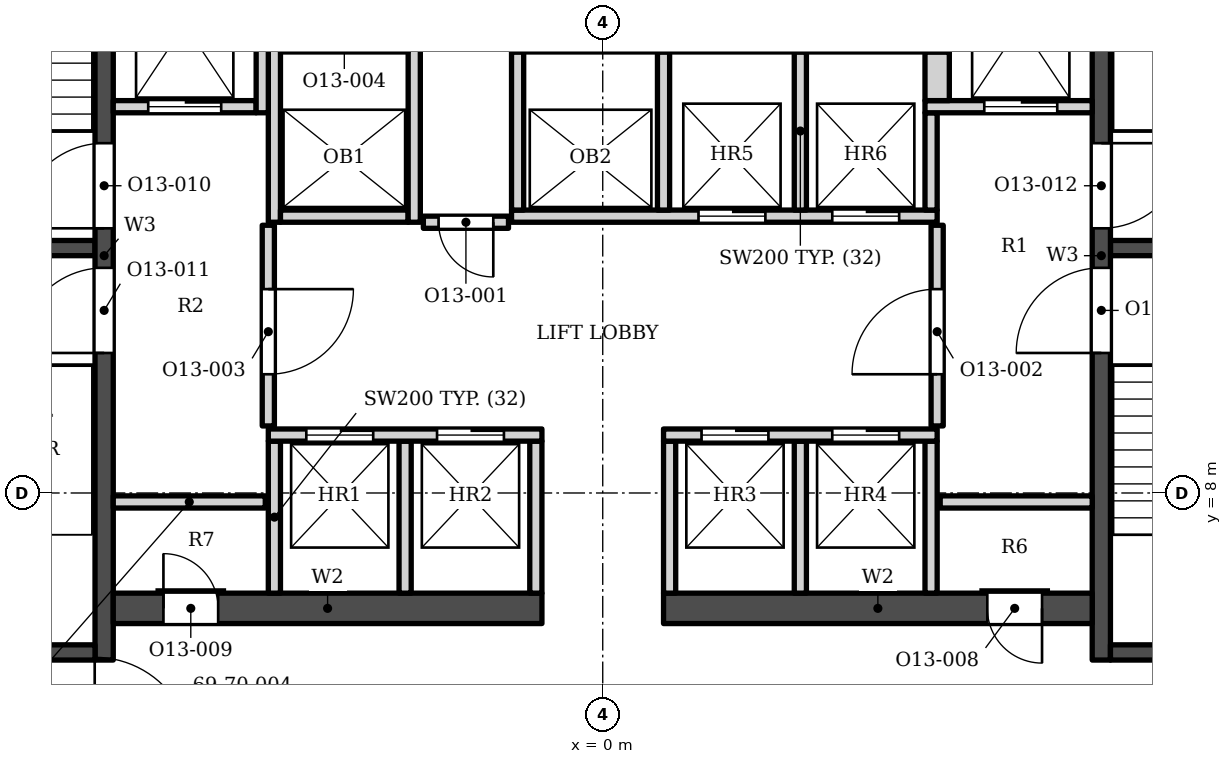
"""IFC4 building model, lengths in metres.
Left out: names, types, materials, properties, quantities, classifications, styles, units other than length and angle.
Written with IfcOpenShell. Run it as: python <this file> out.ifc"""

import sys

from ifc_helpers import new_model, si_unit, direction, frame, frame_2d, origin, place, context, subcontext, project, spatial, rectangle, extrude, element, fill, save


model = new_model("IFC4")
c1 = context("Model", 3, precision=1e-05, world=origin(), true_north=direction((0.0, 1.0)))
c2 = subcontext(c1, "Body", "Model", "MODEL_VIEW")
j1 = project(units=[si_unit("LENGTHUNIT", "METRE"), si_unit("PLANEANGLEUNIT", "RADIAN")], contexts=[c1])
p1 = place(None, origin())
s1 = spatial("IfcSite", under=j1, at=p1, CompositionType="ELEMENT")
p2 = place(p1, origin())
s2 = spatial("IfcBuilding", under=s1, at=p2, CompositionType="ELEMENT")
p3 = place(p2, frame((0.0, 0.0, 287.2)))
s3 = spatial("IfcBuildingStorey", under=s2, at=p3, CompositionType="ELEMENT", Elevation=287.2)
p4 = place(p3, frame((-8.2, 5.253, 0.0), z_axis=(0.0, 0.0, 1.0), x_axis=(0.0, 1.0, 0.0)))
e1 = element("IfcWall", 1, at=p4, inside=s3, PredefinedType="SHEAR", context=c2, shape_type="SweptSolid", body=[
    extrude(rectangle(XDim=13.3, YDim=0.3, at=frame_2d((6.65, 0.0))), origin(), (0.0, 0.0, 1.0), 3.9),
])
p5 = place(p4, frame((7.1, 0.0, 0.0)))
e2 = element("IfcOpeningElement", 2, at=p5, cuts=e1, PredefinedType="OPENING", context=c2, shape_type="SweptSolid", body=[
    extrude(rectangle(XDim=1.4, YDim=2.1, at=frame_2d((0.7, 1.05))), frame((0.0, 0.16, 0.0), z_axis=(0.0, -1.0, 0.0), x_axis=(1.0, 0.0, 0.0)), (0.0, 0.0, 1.0), 0.32),
])
p6 = place(p4, frame((5.05, 0.0, 0.0)))
e3 = element("IfcOpeningElement", 3, at=p6, cuts=e1, PredefinedType="OPENING", context=c2, shape_type="SweptSolid", body=[
    extrude(rectangle(XDim=1.4, YDim=2.1, at=frame_2d((0.7, 1.05))), frame((0.0, 0.16, 0.0), z_axis=(0.0, -1.0, 0.0), x_axis=(1.0, 0.0, 0.0)), (0.0, 0.0, 1.0), 0.32),
])
for number, where, z_axis, x_axis in (
    (4, (-12.1, 12.028, 0.0), (0.0, 0.0, 1.0), (1.0, 0.0, 0.0)),
    (5, (-12.1, 5.378, 0.0), (0.0, 0.0, 1.0), (1.0, 0.0, 0.0)),
):
    element("IfcWall", number, at=place(p3, frame(where, z_axis=z_axis, x_axis=x_axis)), inside=s3, PredefinedType="SHEAR", context=c2, shape_type="SweptSolid", body=[
        extrude(rectangle(XDim=3.75, YDim=0.25, at=frame_2d((1.875, 0.0))), origin(), (0.0, 0.0, 1.0), 3.9),
    ])
p7 = place(p3, frame((8.2, 5.253, 0.0), z_axis=(0.0, 0.0, 1.0), x_axis=(0.0, 1.0, 0.0)))
e6 = element("IfcWall", 6, at=p7, inside=s3, PredefinedType="SHEAR", context=c2, shape_type="SweptSolid", body=[
    extrude(rectangle(XDim=13.3, YDim=0.3, at=frame_2d((6.65, 0.0))), origin(), (0.0, 0.0, 1.0), 3.9),
])
p8 = place(p7, frame((7.1, 0.0, 0.0)))
e7 = element("IfcOpeningElement", 7, at=p8, cuts=e6, PredefinedType="OPENING", context=c2, shape_type="SweptSolid", body=[
    extrude(rectangle(XDim=1.4, YDim=2.1, at=frame_2d((0.7, 1.05))), frame((0.0, 0.16, 0.0), z_axis=(0.0, -1.0, 0.0), x_axis=(1.0, 0.0, 0.0)), (0.0, 0.0, 1.0), 0.32),
])
p9 = place(p7, frame((5.05, 0.0, 0.0)))
e8 = element("IfcOpeningElement", 8, at=p9, cuts=e6, PredefinedType="OPENING", context=c2, shape_type="SweptSolid", body=[
    extrude(rectangle(XDim=1.4, YDim=2.1, at=frame_2d((0.7, 1.05))), frame((0.0, 0.16, 0.0), z_axis=(0.0, -1.0, 0.0), x_axis=(1.0, 0.0, 0.0)), (0.0, 0.0, 1.0), 0.32),
])
for number, where, z_axis, x_axis in (
    (9, (8.35, 12.028, 0.0), (0.0, 0.0, 1.0), (1.0, 0.0, 0.0)),
    (10, (8.35, 5.378, 0.0), (0.0, 0.0, 1.0), (1.0, 0.0, 0.0)),
):
    element("IfcWall", number, at=place(p3, frame(where, z_axis=z_axis, x_axis=x_axis)), inside=s3, PredefinedType="SHEAR", context=c2, shape_type="SweptSolid", body=[
        extrude(rectangle(XDim=3.75, YDim=0.25, at=frame_2d((1.875, 0.0))), origin(), (0.0, 0.0, 1.0), 3.9),
    ])
p10 = place(p3, frame((-8.05, 6.103, 0.0), z_axis=(0.0, 0.0, 1.0), x_axis=(1.0, 0.0, 0.0)))
e11 = element("IfcWall", 11, at=p10, inside=s3, PredefinedType="SHEAR", context=c2, shape_type="SweptSolid", body=[
    extrude(rectangle(XDim=7.05, YDim=0.5, at=frame_2d((3.525, 0.0))), origin(), (0.0, 0.0, 1.0), 3.9),
])
p11 = place(p10, frame((0.825, 0.0, 0.0)))
e12 = element("IfcOpeningElement", 12, at=p11, cuts=e11, PredefinedType="OPENING", context=c2, shape_type="SweptSolid", body=[
    extrude(rectangle(XDim=0.9, YDim=2.1, at=frame_2d((0.45, 1.05))), frame((0.0, 0.26, 0.0), z_axis=(0.0, -1.0, 0.0), x_axis=(1.0, 0.0, 0.0)), (0.0, 0.0, 1.0), 0.52),
])
p12 = place(p3, frame((1.0, 6.103, 0.0), z_axis=(0.0, 0.0, 1.0), x_axis=(1.0, 0.0, 0.0)))
e13 = element("IfcWall", 13, at=p12, inside=s3, PredefinedType="SHEAR", context=c2, shape_type="SweptSolid", body=[
    extrude(rectangle(XDim=7.05, YDim=0.5, at=frame_2d((3.525, 0.0))), origin(), (0.0, 0.0, 1.0), 3.9),
])
p13 = place(p12, frame((5.325, 0.0, 0.0)))
e14 = element("IfcOpeningElement", 14, at=p13, cuts=e13, PredefinedType="OPENING", context=c2, shape_type="SweptSolid", body=[
    extrude(rectangle(XDim=0.9, YDim=2.1, at=frame_2d((0.45, 1.05))), frame((0.0, 0.26, 0.0), z_axis=(0.0, -1.0, 0.0), x_axis=(1.0, 0.0, 0.0)), (0.0, 0.0, 1.0), 0.52),
])
for number, where, z_axis, x_axis in (
    (15, (-5.4, 6.353, 0.0), (0.0, 0.0, 1.0), (0.0, 1.0, 0.0)),
    (16, (-3.25, 6.353, 0.0), (0.0, 0.0, 1.0), (0.0, 1.0, 0.0)),
    (17, (-1.1, 6.353, 0.0), (0.0, 0.0, 1.0), (0.0, 1.0, 0.0)),
    (18, (1.1, 6.353, 0.0), (0.0, 0.0, 1.0), (0.0, 1.0, 0.0)),
    (19, (3.25, 6.353, 0.0), (0.0, 0.0, 1.0), (0.0, 1.0, 0.0)),
    (20, (5.4, 6.353, 0.0), (0.0, 0.0, 1.0), (0.0, 1.0, 0.0)),
    (21, (-8.05, 7.853, 0.0), (0.0, 0.0, 1.0), (1.0, 0.0, 0.0)),
    (22, (5.55, 7.853, 0.0), (0.0, 0.0, 1.0), (1.0, 0.0, 0.0)),
):
    element("IfcWall", number, at=place(p3, frame(where, z_axis=z_axis, x_axis=x_axis)), inside=s3, PredefinedType="SOLIDWALL", context=c2, shape_type="SweptSolid", body=[
        extrude(rectangle(XDim=2.5, YDim=0.2, at=frame_2d((1.25, 0.0))), origin(), (0.0, 0.0, 1.0), 3.73),
    ])
p14 = place(p3, frame((-5.5, 8.953, 0.0), z_axis=(0.0, 0.0, 1.0), x_axis=(1.0, 0.0, 0.0)))
e23 = element("IfcWall", 23, at=p14, inside=s3, PredefinedType="SOLIDWALL", context=c2, shape_type="SweptSolid", body=[
    extrude(rectangle(XDim=4.5, YDim=0.2, at=frame_2d((2.25, 0.0))), origin(), (0.0, 0.0, 1.0), 3.73),
])
p15 = place(p14, frame((0.625, 0.0, 0.0)))
e24 = element("IfcOpeningElement", 24, at=p15, cuts=e23, PredefinedType="OPENING", context=c2, shape_type="SweptSolid", body=[
    extrude(rectangle(XDim=1.1, YDim=2.1, at=frame_2d((0.55, 1.05))), frame((0.0, 0.11, 0.0), z_axis=(0.0, -1.0, 0.0), x_axis=(1.0, 0.0, 0.0)), (0.0, 0.0, 1.0), 0.22),
])
p16 = place(p14, frame((2.775, 0.0, 0.0)))
e25 = element("IfcOpeningElement", 25, at=p16, cuts=e23, PredefinedType="OPENING", context=c2, shape_type="SweptSolid", body=[
    extrude(rectangle(XDim=1.1, YDim=2.1, at=frame_2d((0.55, 1.05))), frame((0.0, 0.11, 0.0), z_axis=(0.0, -1.0, 0.0), x_axis=(1.0, 0.0, 0.0)), (0.0, 0.0, 1.0), 0.22),
])
p17 = place(p3, frame((1.0, 8.953, 0.0), z_axis=(0.0, 0.0, 1.0), x_axis=(1.0, 0.0, 0.0)))
e26 = element("IfcWall", 26, at=p17, inside=s3, PredefinedType="SOLIDWALL", context=c2, shape_type="SweptSolid", body=[
    extrude(rectangle(XDim=4.5, YDim=0.2, at=frame_2d((2.25, 0.0))), origin(), (0.0, 0.0, 1.0), 3.73),
])
p18 = place(p17, frame((0.625, 0.0, 0.0)))
e27 = element("IfcOpeningElement", 27, at=p18, cuts=e26, PredefinedType="OPENING", context=c2, shape_type="SweptSolid", body=[
    extrude(rectangle(XDim=1.1, YDim=2.1, at=frame_2d((0.55, 1.05))), frame((0.0, 0.11, 0.0), z_axis=(0.0, -1.0, 0.0), x_axis=(1.0, 0.0, 0.0)), (0.0, 0.0, 1.0), 0.22),
])
p19 = place(p17, frame((2.775, 0.0, 0.0)))
e28 = element("IfcOpeningElement", 28, at=p19, cuts=e26, PredefinedType="OPENING", context=c2, shape_type="SweptSolid", body=[
    extrude(rectangle(XDim=1.1, YDim=2.1, at=frame_2d((0.55, 1.05))), frame((0.0, 0.11, 0.0), z_axis=(0.0, -1.0, 0.0), x_axis=(1.0, 0.0, 0.0)), (0.0, 0.0, 1.0), 0.22),
])
p20 = place(p3, frame((-5.5, 9.103, 0.0), z_axis=(0.0, 0.0, 1.0), x_axis=(0.0, 1.0, 0.0)))
e29 = element("IfcWall", 29, at=p20, inside=s3, PredefinedType="SOLIDWALL", context=c2, shape_type="SweptSolid", body=[
    extrude(rectangle(XDim=3.3, YDim=0.2, at=frame_2d((1.65, 0.0))), origin(), (0.0, 0.0, 1.0), 3.73),
])
p21 = place(p20, frame((0.85, 0.0, 0.0)))
e30 = element("IfcOpeningElement", 30, at=p21, cuts=e29, PredefinedType="OPENING", context=c2, shape_type="SweptSolid", body=[
    extrude(rectangle(XDim=1.4, YDim=2.1, at=frame_2d((0.7, 1.05))), frame((0.0, 0.11, 0.0), z_axis=(0.0, -1.0, 0.0), x_axis=(1.0, 0.0, 0.0)), (0.0, 0.0, 1.0), 0.22),
])
p22 = place(p3, frame((5.5, 9.103, 0.0), z_axis=(0.0, 0.0, 1.0), x_axis=(0.0, 1.0, 0.0)))
e31 = element("IfcWall", 31, at=p22, inside=s3, PredefinedType="SOLIDWALL", context=c2, shape_type="SweptSolid", body=[
    extrude(rectangle(XDim=3.3, YDim=0.2, at=frame_2d((1.65, 0.0))), origin(), (0.0, 0.0, 1.0), 3.73),
])
p23 = place(p22, frame((0.85, 0.0, 0.0)))
e32 = element("IfcOpeningElement", 32, at=p23, cuts=e31, PredefinedType="OPENING", context=c2, shape_type="SweptSolid", body=[
    extrude(rectangle(XDim=1.4, YDim=2.1, at=frame_2d((0.7, 1.05))), frame((0.0, 0.11, 0.0), z_axis=(0.0, -1.0, 0.0), x_axis=(1.0, 0.0, 0.0)), (0.0, 0.0, 1.0), 0.22),
])
p24 = place(p3, frame((-2.95, 12.453, 0.0), z_axis=(0.0, 0.0, 1.0), x_axis=(1.0, 0.0, 0.0)))
e33 = element("IfcWall", 33, at=p24, inside=s3, PredefinedType="SOLIDWALL", context=c2, shape_type="SweptSolid", body=[
    extrude(rectangle(XDim=1.4, YDim=0.2, at=frame_2d((0.7, 0.0))), origin(), (0.0, 0.0, 1.0), 3.73),
])
p25 = place(p24, frame((0.25, 0.0, 0.0)))
e34 = element("IfcOpeningElement", 34, at=p25, cuts=e33, PredefinedType="OPENING", context=c2, shape_type="SweptSolid", body=[
    extrude(rectangle(XDim=0.9, YDim=2.1, at=frame_2d((0.45, 1.05))), frame((0.0, 0.11, 0.0), z_axis=(0.0, -1.0, 0.0), x_axis=(1.0, 0.0, 0.0)), (0.0, 0.0, 1.0), 0.22),
])
p26 = place(p3, frame((-5.4, 12.453, 0.0), z_axis=(0.0, 0.0, 1.0), x_axis=(0.0, 1.0, 0.0)))
e35 = element("IfcWall", 35, at=p26, inside=s3, PredefinedType="SOLIDWALL", context=c2, shape_type="SweptSolid", body=[
    extrude(rectangle(XDim=3.0, YDim=0.2, at=frame_2d((1.5, 0.0))), origin(), (0.0, 0.0, 1.0), 3.73),
])
p27 = place(p3, frame((-5.3, 12.552, 0.0), z_axis=(0.0, 0.0, 1.0), x_axis=(1.0, 0.0, 0.0)))
e36 = element("IfcWall", 36, at=p27, inside=s3, PredefinedType="SOLIDWALL", context=c2, shape_type="SweptSolid", body=[
    extrude(rectangle(XDim=2.1, YDim=0.2, at=frame_2d((1.05, 0.0))), origin(), (0.0, 0.0, 1.0), 3.73),
])
p28 = place(p3, frame((-3.1, 12.453, 0.0), z_axis=(0.0, 0.0, 1.0), x_axis=(0.0, 1.0, 0.0)))
e37 = element("IfcWall", 37, at=p28, inside=s3, PredefinedType="SOLIDWALL", context=c2, shape_type="SweptSolid", body=[
    extrude(rectangle(XDim=3.0, YDim=0.2, at=frame_2d((1.5, 0.0))), origin(), (0.0, 0.0, 1.0), 3.73),
])
p29 = place(p3, frame((-1.5, 12.552, 0.0), z_axis=(0.0, 0.0, 1.0), x_axis=(1.0, 0.0, 0.0)))
e38 = element("IfcWall", 38, at=p29, inside=s3, PredefinedType="SOLIDWALL", context=c2, shape_type="SweptSolid", body=[
    extrude(rectangle(XDim=7.0, YDim=0.2, at=frame_2d((3.5, 0.0))), origin(), (0.0, 0.0, 1.0), 3.73),
])
p30 = place(p29, frame((3.075, 0.0, 0.0)))
e39 = element("IfcOpeningElement", 39, at=p30, cuts=e38, PredefinedType="OPENING", context=c2, shape_type="SweptSolid", body=[
    extrude(rectangle(XDim=1.1, YDim=2.1, at=frame_2d((0.55, 1.05))), frame((0.0, 0.11, 0.0), z_axis=(0.0, -1.0, 0.0), x_axis=(1.0, 0.0, 0.0)), (0.0, 0.0, 1.0), 0.22),
])
p31 = place(p29, frame((5.275, 0.0, 0.0)))
e40 = element("IfcOpeningElement", 40, at=p31, cuts=e38, PredefinedType="OPENING", context=c2, shape_type="SweptSolid", body=[
    extrude(rectangle(XDim=1.1, YDim=2.1, at=frame_2d((0.55, 1.05))), frame((0.0, 0.11, 0.0), z_axis=(0.0, -1.0, 0.0), x_axis=(1.0, 0.0, 0.0)), (0.0, 0.0, 1.0), 0.22),
])
for number, where, z_axis, x_axis in (
    (41, (-1.4, 12.653, 0.0), (0.0, 0.0, 1.0), (0.0, 1.0, 0.0)),
    (42, (1.0, 12.653, 0.0), (0.0, 0.0, 1.0), (0.0, 1.0, 0.0)),
    (43, (3.25, 12.653, 0.0), (0.0, 0.0, 1.0), (0.0, 1.0, 0.0)),
):
    element("IfcWall", number, at=place(p3, frame(where, z_axis=z_axis, x_axis=x_axis)), inside=s3, PredefinedType="SOLIDWALL", context=c2, shape_type="SweptSolid", body=[
        extrude(rectangle(XDim=2.6, YDim=0.2, at=frame_2d((1.3, 0.0))), origin(), (0.0, 0.0, 1.0), 3.73),
    ])
p32 = place(p3, frame((5.4, 12.653, 0.0), z_axis=(0.0, 0.0, 1.0), x_axis=(0.0, 1.0, 0.0)))
e44 = element("IfcWall", 44, at=p32, inside=s3, PredefinedType="SOLIDWALL", context=c2, shape_type="SweptSolid", body=[
    extrude(rectangle(XDim=1.6, YDim=0.2, at=frame_2d((0.8, 0.0))), origin(), (0.0, 0.0, 1.0), 3.73),
])
p33 = place(p3, frame((-8.05, 14.353, 0.0), z_axis=(0.0, 0.0, 1.0), x_axis=(1.0, 0.0, 0.0)))
e45 = element("IfcWall", 45, at=p33, inside=s3, PredefinedType="SOLIDWALL", context=c2, shape_type="SweptSolid", body=[
    extrude(rectangle(XDim=2.35, YDim=0.2, at=frame_2d((1.175, 0.0))), origin(), (0.0, 0.0, 1.0), 3.73),
])
p34 = place(p33, frame((0.575, 0.0, 0.0)))
e46 = element("IfcOpeningElement", 46, at=p34, cuts=e45, PredefinedType="OPENING", context=c2, shape_type="SweptSolid", body=[
    extrude(rectangle(XDim=1.2, YDim=2.1, at=frame_2d((0.6, 1.05))), frame((0.0, 0.11, 0.0), z_axis=(0.0, -1.0, 0.0), x_axis=(1.0, 0.0, 0.0)), (0.0, 0.0, 1.0), 0.22),
])
p35 = place(p3, frame((-5.6, 14.253, 0.0), z_axis=(0.0, 0.0, 1.0), x_axis=(0.0, 1.0, 0.0)))
e47 = element("IfcWall", 47, at=p35, inside=s3, PredefinedType="SOLIDWALL", context=c2, shape_type="SweptSolid", body=[
    extrude(rectangle(XDim=4.3, YDim=0.2, at=frame_2d((2.15, 0.0))), origin(), (0.0, 0.0, 1.0), 3.73),
])
p36 = place(p3, frame((5.3, 14.353, 0.0), z_axis=(0.0, 0.0, 1.0), x_axis=(1.0, 0.0, 0.0)))
e48 = element("IfcWall", 48, at=p36, inside=s3, PredefinedType="SOLIDWALL", context=c2, shape_type="SweptSolid", body=[
    extrude(rectangle(XDim=2.75, YDim=0.2, at=frame_2d((1.375, 0.0))), origin(), (0.0, 0.0, 1.0), 3.73),
])
p37 = place(p36, frame((0.975, 0.0, 0.0)))
e49 = element("IfcOpeningElement", 49, at=p37, cuts=e48, PredefinedType="OPENING", context=c2, shape_type="SweptSolid", body=[
    extrude(rectangle(XDim=1.2, YDim=2.1, at=frame_2d((0.6, 1.05))), frame((0.0, 0.11, 0.0), z_axis=(0.0, -1.0, 0.0), x_axis=(1.0, 0.0, 0.0)), (0.0, 0.0, 1.0), 0.22),
])
p38 = place(p3, frame((5.5, 14.453, 0.0), z_axis=(0.0, 0.0, 1.0), x_axis=(0.0, 1.0, 0.0)))
e50 = element("IfcWall", 50, at=p38, inside=s3, PredefinedType="SOLIDWALL", context=c2, shape_type="SweptSolid", body=[
    extrude(rectangle(XDim=0.8, YDim=0.4, at=frame_2d((0.4, 0.0))), origin(), (0.0, 0.0, 1.0), 3.73),
])
p39 = place(p3, frame((-5.3, 15.353, 0.0), z_axis=(0.0, 0.0, 1.0), x_axis=(1.0, 0.0, 0.0)))
e51 = element("IfcWall", 51, at=p39, inside=s3, PredefinedType="SOLIDWALL", context=c2, shape_type="SweptSolid", body=[
    extrude(rectangle(XDim=2.1, YDim=0.2, at=frame_2d((1.05, 0.0))), origin(), (0.0, 0.0, 1.0), 3.73),
])
p40 = place(p3, frame((-1.5, 15.353, 0.0), z_axis=(0.0, 0.0, 1.0), x_axis=(1.0, 0.0, 0.0)))
e52 = element("IfcWall", 52, at=p40, inside=s3, PredefinedType="SOLIDWALL", context=c2, shape_type="SweptSolid", body=[
    extrude(rectangle(XDim=7.2, YDim=0.2, at=frame_2d((3.6, 0.0))), origin(), (0.0, 0.0, 1.0), 3.73),
])
p41 = place(p15, origin())
e53 = element("IfcDoor", 53, at=p41, inside=s3, OperationType="DOUBLE_DOOR_SLIDING", PredefinedType="DOOR", context=c2, shape_type="SweptSolid", body=[
    extrude(rectangle(XDim=1.1, YDim=2.1, at=frame_2d((0.55, 1.05))), frame((0.0, 0.025, 0.0), z_axis=(0.0, -1.0, 0.0), x_axis=(1.0, 0.0, 0.0)), (0.0, 0.0, 1.0), 0.05),
])
fill(e24, e53)
p42 = place(p16, origin())
e54 = element("IfcDoor", 54, at=p42, inside=s3, OperationType="DOUBLE_DOOR_SLIDING", PredefinedType="DOOR", context=c2, shape_type="SweptSolid", body=[
    extrude(rectangle(XDim=1.1, YDim=2.1, at=frame_2d((0.55, 1.05))), frame((0.0, 0.025, 0.0), z_axis=(0.0, -1.0, 0.0), x_axis=(1.0, 0.0, 0.0)), (0.0, 0.0, 1.0), 0.05),
])
fill(e25, e54)
p43 = place(p18, origin())
e55 = element("IfcDoor", 55, at=p43, inside=s3, OperationType="DOUBLE_DOOR_SLIDING", PredefinedType="DOOR", context=c2, shape_type="SweptSolid", body=[
    extrude(rectangle(XDim=1.1, YDim=2.1, at=frame_2d((0.55, 1.05))), frame((0.0, 0.025, 0.0), z_axis=(0.0, -1.0, 0.0), x_axis=(1.0, 0.0, 0.0)), (0.0, 0.0, 1.0), 0.05),
])
fill(e27, e55)
p44 = place(p19, origin())
e56 = element("IfcDoor", 56, at=p44, inside=s3, OperationType="DOUBLE_DOOR_SLIDING", PredefinedType="DOOR", context=c2, shape_type="SweptSolid", body=[
    extrude(rectangle(XDim=1.1, YDim=2.1, at=frame_2d((0.55, 1.05))), frame((0.0, 0.025, 0.0), z_axis=(0.0, -1.0, 0.0), x_axis=(1.0, 0.0, 0.0)), (0.0, 0.0, 1.0), 0.05),
])
fill(e28, e56)
p45 = place(p30, origin())
e57 = element("IfcDoor", 57, at=p45, inside=s3, OperationType="DOUBLE_DOOR_SLIDING", PredefinedType="DOOR", context=c2, shape_type="SweptSolid", body=[
    extrude(rectangle(XDim=1.1, YDim=2.1, at=frame_2d((0.55, 1.05))), frame((0.0, 0.025, 0.0), z_axis=(0.0, -1.0, 0.0), x_axis=(1.0, 0.0, 0.0)), (0.0, 0.0, 1.0), 0.05),
])
fill(e39, e57)
p46 = place(p31, origin())
e58 = element("IfcDoor", 58, at=p46, inside=s3, OperationType="DOUBLE_DOOR_SLIDING", PredefinedType="DOOR", context=c2, shape_type="SweptSolid", body=[
    extrude(rectangle(XDim=1.1, YDim=2.1, at=frame_2d((0.55, 1.05))), frame((0.0, 0.025, 0.0), z_axis=(0.0, -1.0, 0.0), x_axis=(1.0, 0.0, 0.0)), (0.0, 0.0, 1.0), 0.05),
])
fill(e40, e58)
p47 = place(p34, origin())
e59 = element("IfcDoor", 59, at=p47, inside=s3, OperationType="DOUBLE_DOOR_SLIDING", PredefinedType="DOOR", context=c2, shape_type="SweptSolid", body=[
    extrude(rectangle(XDim=1.2, YDim=2.1, at=frame_2d((0.6, 1.05))), frame((0.0, 0.025, 0.0), z_axis=(0.0, -1.0, 0.0), x_axis=(1.0, 0.0, 0.0)), (0.0, 0.0, 1.0), 0.05),
])
fill(e46, e59)
p48 = place(p37, origin())
e60 = element("IfcDoor", 60, at=p48, inside=s3, OperationType="DOUBLE_DOOR_SLIDING", PredefinedType="DOOR", context=c2, shape_type="SweptSolid", body=[
    extrude(rectangle(XDim=1.2, YDim=2.1, at=frame_2d((0.6, 1.05))), frame((0.0, 0.025, 0.0), z_axis=(0.0, -1.0, 0.0), x_axis=(1.0, 0.0, 0.0)), (0.0, 0.0, 1.0), 0.05),
])
fill(e49, e60)
p49 = place(p5, origin())
e61 = element("IfcDoor", 61, at=p49, inside=s3, OperationType="SINGLE_SWING_LEFT", PredefinedType="DOOR", context=c2, shape_type="SweptSolid", body=[
    extrude(rectangle(XDim=1.4, YDim=2.1, at=frame_2d((0.7, 1.05))), frame((0.0, 0.025, 0.0), z_axis=(0.0, -1.0, 0.0), x_axis=(1.0, 0.0, 0.0)), (0.0, 0.0, 1.0), 0.05),
])
fill(e2, e61)
p50 = place(p6, origin())
e62 = element("IfcDoor", 62, at=p50, inside=s3, OperationType="SINGLE_SWING_LEFT", PredefinedType="DOOR", context=c2, shape_type="SweptSolid", body=[
    extrude(rectangle(XDim=1.4, YDim=2.1, at=frame_2d((0.7, 1.05))), frame((0.0, 0.025, 0.0), z_axis=(0.0, -1.0, 0.0), x_axis=(1.0, 0.0, 0.0)), (0.0, 0.0, 1.0), 0.05),
])
fill(e3, e62)
p51 = place(p8, origin())
e63 = element("IfcDoor", 63, at=p51, inside=s3, OperationType="SINGLE_SWING_RIGHT", PredefinedType="DOOR", context=c2, shape_type="SweptSolid", body=[
    extrude(rectangle(XDim=1.4, YDim=2.1, at=frame_2d((0.7, 1.05))), frame((0.0, 0.025, 0.0), z_axis=(0.0, -1.0, 0.0), x_axis=(1.0, 0.0, 0.0)), (0.0, 0.0, 1.0), 0.05),
])
fill(e7, e63)
p52 = place(p9, origin())
e64 = element("IfcDoor", 64, at=p52, inside=s3, OperationType="SINGLE_SWING_LEFT", PredefinedType="DOOR", context=c2, shape_type="SweptSolid", body=[
    extrude(rectangle(XDim=1.4, YDim=2.1, at=frame_2d((0.7, 1.05))), frame((0.0, 0.025, 0.0), z_axis=(0.0, -1.0, 0.0), x_axis=(1.0, 0.0, 0.0)), (0.0, 0.0, 1.0), 0.05),
])
fill(e8, e64)
p53 = place(p25, origin())
e65 = element("IfcDoor", 65, at=p53, inside=s3, OperationType="SINGLE_SWING_RIGHT", PredefinedType="DOOR", context=c2, shape_type="SweptSolid", body=[
    extrude(rectangle(XDim=0.9, YDim=2.1, at=frame_2d((0.45, 1.05))), frame((0.0, 0.025, 0.0), z_axis=(0.0, -1.0, 0.0), x_axis=(1.0, 0.0, 0.0)), (0.0, 0.0, 1.0), 0.05),
])
fill(e34, e65)
p54 = place(p21, origin())
e66 = element("IfcDoor", 66, at=p54, inside=s3, OperationType="SINGLE_SWING_RIGHT", PredefinedType="DOOR", context=c2, shape_type="SweptSolid", body=[
    extrude(rectangle(XDim=1.4, YDim=2.1, at=frame_2d((0.7, 1.05))), frame((0.0, 0.025, 0.0), z_axis=(0.0, -1.0, 0.0), x_axis=(1.0, 0.0, 0.0)), (0.0, 0.0, 1.0), 0.05),
])
fill(e30, e66)
p55 = place(p23, origin())
e67 = element("IfcDoor", 67, at=p55, inside=s3, OperationType="SINGLE_SWING_LEFT", PredefinedType="DOOR", context=c2, shape_type="SweptSolid", body=[
    extrude(rectangle(XDim=1.4, YDim=2.1, at=frame_2d((0.7, 1.05))), frame((0.0, 0.025, 0.0), z_axis=(0.0, -1.0, 0.0), x_axis=(1.0, 0.0, 0.0)), (0.0, 0.0, 1.0), 0.05),
])
fill(e32, e67)
p56 = place(p11, origin())
e68 = element("IfcDoor", 68, at=p56, inside=s3, OperationType="SINGLE_SWING_LEFT", PredefinedType="DOOR", context=c2, shape_type="SweptSolid", body=[
    extrude(rectangle(XDim=0.9, YDim=2.1, at=frame_2d((0.45, 1.05))), frame((0.0, 0.025, 0.0), z_axis=(0.0, -1.0, 0.0), x_axis=(1.0, 0.0, 0.0)), (0.0, 0.0, 1.0), 0.05),
])
fill(e12, e68)
p57 = place(p13, origin())
e69 = element("IfcDoor", 69, at=p57, inside=s3, OperationType="SINGLE_SWING_RIGHT", PredefinedType="DOOR", context=c2, shape_type="SweptSolid", body=[
    extrude(rectangle(XDim=0.9, YDim=2.1, at=frame_2d((0.45, 1.05))), frame((0.0, 0.025, 0.0), z_axis=(0.0, -1.0, 0.0), x_axis=(1.0, 0.0, 0.0)), (0.0, 0.0, 1.0), 0.05),
])
fill(e14, e69)
save(model, sys.argv[1])
